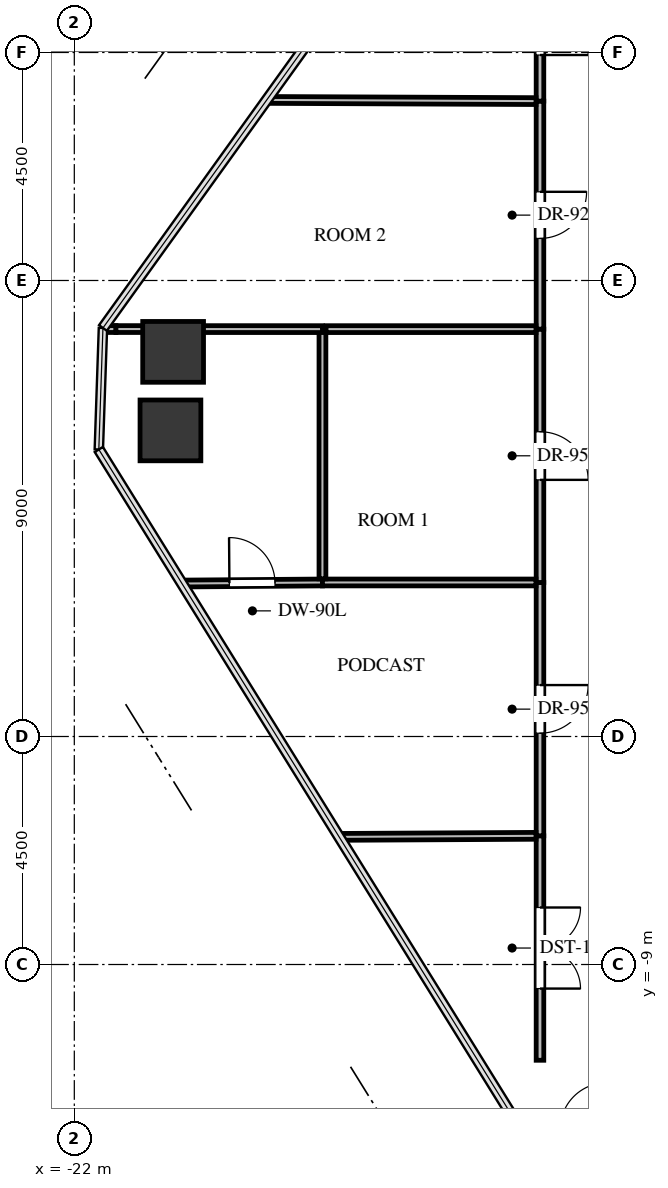
"""IFC4 building model, lengths in metres.
Left out: names, types, materials, properties, quantities, classifications, styles, units other than length and angle.
Written with IfcOpenShell. Run it as: python <this file> out.ifc"""

import sys

from ifc_helpers import new_model, si_unit, direction, frame, frame_2d, origin, origin_2d, place, context, subcontext, project, spatial, rectangle, extrude, source, transform, mapped, element, fill, save


model = new_model("IFC4")
c1 = context("Model", 3, precision=1e-05, world=origin(), true_north=direction((0.0, 1.0)))
c2 = subcontext(c1, "Body", "Model", "MODEL_VIEW")
j1 = project(units=[si_unit("LENGTHUNIT", "METRE"), si_unit("PLANEANGLEUNIT", "RADIAN")], contexts=[c1])
p1 = place(None, origin())
s1 = spatial("IfcSite", under=j1, at=p1, CompositionType="ELEMENT")
p2 = place(p1, origin())
s2 = spatial("IfcBuilding", under=s1, at=p2, CompositionType="ELEMENT")
p3 = place(p2, frame((0.0, 0.0, 123.9)))
s3 = spatial("IfcBuildingStorey", under=s2, at=p3, CompositionType="ELEMENT", Elevation=123.9)
m1 = source(origin(), c2, "Body", "SweptSolid", [
    extrude(rectangle(XDim=1.2, YDim=1.2, at=origin_2d()), origin(), (0.0, 0.0, 1.0), 3.3),
])
for number, where, z_axis, x_axis in (
    (1, (-20.103, 1.542, -0.24), (0.0, 0.0, 1.0), (1.0, 0.0, 0.0)),
    (2, (-20.05, 3.091, -0.24), (0.0, 0.0, 1.0), (1.0, 0.0, 0.0)),
):
    element("IfcColumn", number, at=place(p3, frame(where, z_axis=z_axis, x_axis=x_axis)), inside=s3, PredefinedType="COLUMN", context=c2, shape_type="MappedRepresentation", body=[
        mapped(m1, transform((0.0, 0.0, 0.0), x_axis=(1.0, 0.0, 0.0), y_axis=(0.0, 1.0, 0.0), z_axis=(0.0, 0.0, 1.0), scale=1.0)),
    ])
p4 = place(p3, frame((-12.81, -6.46, 0.0), z_axis=(0.0, 0.0, 1.0), x_axis=(0.0, -1.0, 0.0)))
e3 = element("IfcWall", 3, at=p4, inside=s3, PredefinedType="PARTITIONING", context=c2, shape_type="SweptSolid", body=[
    extrude(rectangle(XDim=4.43, YDim=0.15, at=frame_2d((2.215, 0.0))), origin(), (0.0, 0.0, 1.0), 2.38),
])
p5 = place(p4, frame((1.415, 0.0, 0.0)))
e4 = element("IfcOpeningElement", 4, at=p5, cuts=e3, PredefinedType="OPENING", context=c2, shape_type="SweptSolid", body=[
    extrude(rectangle(XDim=1.6, YDim=2.15, at=frame_2d((0.8, 1.075))), frame((0.0, 0.085, 0.0), z_axis=(0.0, -1.0, 0.0), x_axis=(1.0, 0.0, 0.0)), (0.0, 0.0, 1.0), 0.17),
])
p6 = place(p3, frame((-12.81, -1.46, 0.0), z_axis=(0.0, 0.0, 1.0), x_axis=(0.0, -1.0, 0.0)))
e5 = element("IfcWall", 5, at=p6, inside=s3, PredefinedType="PARTITIONING", context=c2, shape_type="SweptSolid", body=[
    extrude(rectangle(XDim=5.0, YDim=0.15, at=frame_2d((2.5, 0.0))), origin(), (0.0, 0.0, 1.0), 3.045),
])
p7 = place(p6, frame((2.025, 0.0, 0.0)))
e6 = element("IfcOpeningElement", 6, at=p7, cuts=e5, PredefinedType="OPENING", context=c2, shape_type="SweptSolid", body=[
    extrude(rectangle(XDim=0.95, YDim=2.1, at=frame_2d((0.475, 1.05))), frame((0.0, 0.085, 0.0), z_axis=(0.0, -1.0, 0.0), x_axis=(1.0, 0.0, 0.0)), (0.0, 0.0, 1.0), 0.17),
])
p8 = place(p3, frame((-12.81, 3.54, 0.0), z_axis=(0.0, 0.0, 1.0), x_axis=(0.0, -1.0, 0.0)))
e7 = element("IfcWall", 7, at=p8, inside=s3, PredefinedType="PARTITIONING", context=c2, shape_type="SweptSolid", body=[
    extrude(rectangle(XDim=5.0, YDim=0.15, at=frame_2d((2.5, 0.0))), origin(), (0.0, 0.0, 1.0), 2.212),
])
p9 = place(p8, frame((2.025, 0.0, 0.0)))
e8 = element("IfcOpeningElement", 8, at=p9, cuts=e7, PredefinedType="OPENING", context=c2, shape_type="SweptSolid", body=[
    extrude(rectangle(XDim=0.95, YDim=2.1, at=frame_2d((0.475, 1.05))), frame((0.0, 0.085, 0.0), z_axis=(0.0, -1.0, 0.0), x_axis=(1.0, 0.0, 0.0)), (0.0, 0.0, 1.0), 0.17),
])
p10 = place(p3, frame((-12.81, 8.04, 0.0), z_axis=(0.0, 0.0, 1.0), x_axis=(0.0, -1.0, 0.0)))
e9 = element("IfcWall", 9, at=p10, inside=s3, PredefinedType="PARTITIONING", context=c2, shape_type="SweptSolid", body=[
    extrude(rectangle(XDim=4.5, YDim=0.15, at=frame_2d((2.25, 0.0))), origin(), (0.0, 0.0, 1.0), 3.045),
])
p11 = place(p10, frame((1.79, 0.0, 0.0)))
e10 = element("IfcOpeningElement", 10, at=p11, cuts=e9, PredefinedType="OPENING", context=c2, shape_type="SweptSolid", body=[
    extrude(rectangle(XDim=0.92, YDim=2.1, at=frame_2d((0.46, 1.05))), frame((0.0, 0.085, 0.0), z_axis=(0.0, -1.0, 0.0), x_axis=(1.0, 0.0, 0.0)), (0.0, 0.0, 1.0), 0.17),
])
p12 = place(p3, frame((-12.81, 10.81, 0.0), z_axis=(0.0, 0.0, 1.0), x_axis=(0.0, -1.0, 0.0)))
e11 = element("IfcWall", 11, at=p12, inside=s3, PredefinedType="PARTITIONING", context=c2, shape_type="SweptSolid", body=[
    extrude(rectangle(XDim=2.77, YDim=0.15, at=frame_2d((1.385, 0.0))), origin(), (0.0, 0.0, 1.0), 3.045),
])
p13 = place(p12, frame((0.91, 0.0, 0.0)))
e12 = element("IfcOpeningElement", 12, at=p13, cuts=e11, PredefinedType="OPENING", context=c2, shape_type="SweptSolid", body=[
    extrude(rectangle(XDim=0.95, YDim=2.1, at=frame_2d((0.475, 1.05))), frame((0.0, 0.085, 0.0), z_axis=(0.0, -1.0, 0.0), x_axis=(1.0, 0.0, 0.0)), (0.0, 0.0, 1.0), 0.17),
])
p14 = place(p3, frame((-16.774, -6.481, 0.0), z_axis=(0.0, 0.0, 1.0), x_axis=(0.999985736048, 0.005341132812, 0.0)))
e13 = element("IfcWall", 13, at=p14, inside=s3, PredefinedType="PARTITIONING", context=c2, shape_type="SweptSolid", body=[
    extrude(rectangle(XDim=3.885, YDim=0.135, at=frame_2d((1.943, 0.0))), origin(), (0.0, 0.0, 1.0), 2.38),
])
p15 = place(p3, frame((-19.875, -1.481, 0.0), z_axis=(0.0, 0.0, 1.0), x_axis=(0.999970654695, 0.007660923473, 0.0)))
e14 = element("IfcWall", 14, at=p15, inside=s3, PredefinedType="PARTITIONING", context=c2, shape_type="SweptSolid", body=[
    extrude(rectangle(XDim=2.772, YDim=0.135, at=frame_2d((1.386, 0.0))), origin(), (0.0, 0.0, 1.0), 2.38),
])
p16 = place(p15, frame((0.936, 0.0, 0.0)))
e15 = element("IfcOpeningElement", 15, at=p16, cuts=e14, PredefinedType="OPENING", context=c2, shape_type="SweptSolid", body=[
    extrude(rectangle(XDim=0.9, YDim=2.05, at=frame_2d((0.45, 1.025))), frame((0.0, 0.078, 0.0), z_axis=(0.0, -1.0, 0.0), x_axis=(1.0, 0.0, 0.0)), (0.0, 0.0, 1.0), 0.155),
])
p17 = place(p3, frame((-17.103, -1.46, 0.0), z_axis=(0.0, 0.0, 1.0), x_axis=(1.0, 0.0, 0.0)))
e16 = element("IfcWall", 16, at=p17, inside=s3, PredefinedType="PARTITIONING", context=c2, shape_type="SweptSolid", body=[
    extrude(rectangle(XDim=4.214, YDim=0.135, at=frame_2d((2.107, 0.0))), origin(), (0.0, 0.0, 1.0), 3.045),
])
p18 = place(p3, frame((-17.103, 3.54, 0.0), z_axis=(0.0, 0.0, 1.0), x_axis=(0.0, -1.0, 0.0)))
e17 = element("IfcWall", 17, at=p18, inside=s3, PredefinedType="PARTITIONING", context=c2, shape_type="SweptSolid", body=[
    extrude(rectangle(XDim=4.928, YDim=0.135, at=frame_2d((2.464, 0.0))), origin(), (0.0, 0.0, 1.0), 2.212),
])
p19 = place(p3, frame((-21.436, 3.542, 0.0), z_axis=(0.0, 0.0, 1.0), x_axis=(0.999999550774, -0.000947866873, 0.0)))
e18 = element("IfcWall", 18, at=p19, inside=s3, PredefinedType="PARTITIONING", context=c2, shape_type="SweptSolid", body=[
    extrude(rectangle(XDim=0.258, YDim=0.135, at=frame_2d((0.129, 0.0))), origin(), (0.0, 0.0, 1.0), 1.877),
])
p20 = place(p3, frame((-20.175, 3.541, 0.0), z_axis=(0.0, 0.0, 1.0), x_axis=(0.999999949473, -0.0003178892, 0.0)))
e19 = element("IfcWall", 19, at=p20, inside=s3, PredefinedType="PARTITIONING", context=c2, shape_type="SweptSolid", body=[
    extrude(rectangle(XDim=3.072, YDim=0.135, at=frame_2d((1.536, 0.0))), origin(), (0.0, 0.0, 1.0), 1.877),
])
p21 = place(p3, frame((-21.178, 3.541, 0.0), z_axis=(0.0, 0.0, 1.0), x_axis=(0.999999970372, -0.000243427451, 0.0)))
e20 = element("IfcWall", 20, at=p21, inside=s3, PredefinedType="PARTITIONING", context=c2, shape_type="SweptSolid", body=[
    extrude(rectangle(XDim=1.003, YDim=0.135, at=frame_2d((0.501, 0.0))), origin(), (0.0, 0.0, 1.0), 1.877),
])
p22 = place(p3, frame((-17.031, 3.54, 0.0), z_axis=(0.0, 0.0, 1.0), x_axis=(1.0, 0.0, 0.0)))
e21 = element("IfcWall", 21, at=p22, inside=s3, PredefinedType="PARTITIONING", context=c2, shape_type="SweptSolid", body=[
    extrude(rectangle(XDim=4.143, YDim=0.135, at=frame_2d((2.071, 0.0))), origin(), (0.0, 0.0, 1.0), 3.045),
])
p23 = place(p3, frame((-18.202, 8.063, 0.0), z_axis=(0.0, 0.0, 1.0), x_axis=(0.999990671281, -0.004319415637, 0.0)))
e22 = element("IfcWall", 22, at=p23, inside=s3, PredefinedType="PARTITIONING", context=c2, shape_type="SweptSolid", body=[
    extrude(rectangle(XDim=5.313, YDim=0.135, at=frame_2d((2.656, 0.0))), origin(), (0.0, 0.0, 1.0), 2.38),
])
m2 = source(origin(), c2, "Body", "SweptSolid", [
    extrude(rectangle(XDim=1.6, YDim=2.15, at=frame_2d((0.8, 1.075))), frame((0.0, 0.025, 0.0), z_axis=(0.0, -1.0, 0.0), x_axis=(1.0, 0.0, 0.0)), (0.0, 0.0, 1.0), 0.05),
])
p24 = place(p5, origin())
e23 = element("IfcDoor", 23, at=p24, inside=s3, OperationType="DOUBLE_DOOR_SINGLE_SWING", PredefinedType="DOOR", context=c2, shape_type="MappedRepresentation", body=[
    mapped(m2, transform((0.0, 0.0, 0.0), x_axis=(1.0, 0.0, 0.0), y_axis=(0.0, 1.0, 0.0), z_axis=(0.0, 0.0, 1.0), scale=1.0)),
])
fill(e4, e23)
m3 = source(origin(), c2, "Body", "SweptSolid", [
    extrude(rectangle(XDim=0.95, YDim=2.1, at=frame_2d((0.475, 1.05))), frame((0.0, 0.025, 0.0), z_axis=(0.0, -1.0, 0.0), x_axis=(1.0, 0.0, 0.0)), (0.0, 0.0, 1.0), 0.05),
])
p25 = place(p7, origin())
e24 = element("IfcDoor", 24, at=p25, inside=s3, OperationType="SINGLE_SWING_LEFT", PredefinedType="DOOR", context=c2, shape_type="MappedRepresentation", body=[
    mapped(m3, transform((0.0, 0.0, 0.0), x_axis=(1.0, 0.0, 0.0), y_axis=(0.0, 1.0, 0.0), z_axis=(0.0, 0.0, 1.0), scale=1.0)),
])
fill(e6, e24)
m4 = source(origin(), c2, "Body", "SweptSolid", [
    extrude(rectangle(XDim=0.95, YDim=2.1, at=frame_2d((0.475, 1.05))), frame((0.0, 0.025, 0.0), z_axis=(0.0, -1.0, 0.0), x_axis=(1.0, 0.0, 0.0)), (0.0, 0.0, 1.0), 0.05),
])
p26 = place(p9, origin())
e25 = element("IfcDoor", 25, at=p26, inside=s3, OperationType="SINGLE_SWING_RIGHT", PredefinedType="DOOR", context=c2, shape_type="MappedRepresentation", body=[
    mapped(m4, transform((0.0, 0.0, 0.0), x_axis=(1.0, 0.0, 0.0), y_axis=(0.0, 1.0, 0.0), z_axis=(0.0, 0.0, 1.0), scale=1.0)),
])
fill(e8, e25)
m5 = source(origin(), c2, "Body", "SweptSolid", [
    extrude(rectangle(XDim=0.92, YDim=2.1, at=frame_2d((0.46, 1.05))), frame((0.0, 0.025, 0.0), z_axis=(0.0, -1.0, 0.0), x_axis=(1.0, 0.0, 0.0)), (0.0, 0.0, 1.0), 0.05),
])
p27 = place(p11, origin())
e26 = element("IfcDoor", 26, at=p27, inside=s3, OperationType="SINGLE_SWING_LEFT", PredefinedType="DOOR", context=c2, shape_type="MappedRepresentation", body=[
    mapped(m5, transform((0.0, 0.0, 0.0), x_axis=(1.0, 0.0, 0.0), y_axis=(0.0, 1.0, 0.0), z_axis=(0.0, 0.0, 1.0), scale=1.0)),
])
fill(e10, e26)
p28 = place(p13, origin())
e27 = element("IfcDoor", 27, at=p28, inside=s3, OperationType="SINGLE_SWING_RIGHT", PredefinedType="DOOR", context=c2, shape_type="MappedRepresentation", body=[
    mapped(m4, transform((0.0, 0.0, 0.0), x_axis=(1.0, 0.0, 0.0), y_axis=(0.0, 1.0, 0.0), z_axis=(0.0, 0.0, 1.0), scale=1.0)),
])
fill(e12, e27)
m6 = source(origin(), c2, "Body", "SweptSolid", [
    extrude(rectangle(XDim=0.9, YDim=2.05, at=frame_2d((0.45, 1.025))), frame((0.0, 0.025, 0.0), z_axis=(0.0, -1.0, 0.0), x_axis=(1.0, 0.0, 0.0)), (0.0, 0.0, 1.0), 0.05),
])
p29 = place(p16, origin())
e28 = element("IfcDoor", 28, at=p29, inside=s3, OperationType="SINGLE_SWING_LEFT", PredefinedType="DOOR", context=c2, shape_type="MappedRepresentation", body=[
    mapped(m6, transform((0.0, 0.0, 0.0), x_axis=(1.0, 0.0, 0.0), y_axis=(0.0, 1.0, 0.0), z_axis=(0.0, 0.0, 1.0), scale=1.0)),
])
fill(e15, e28)
save(model, sys.argv[1])
